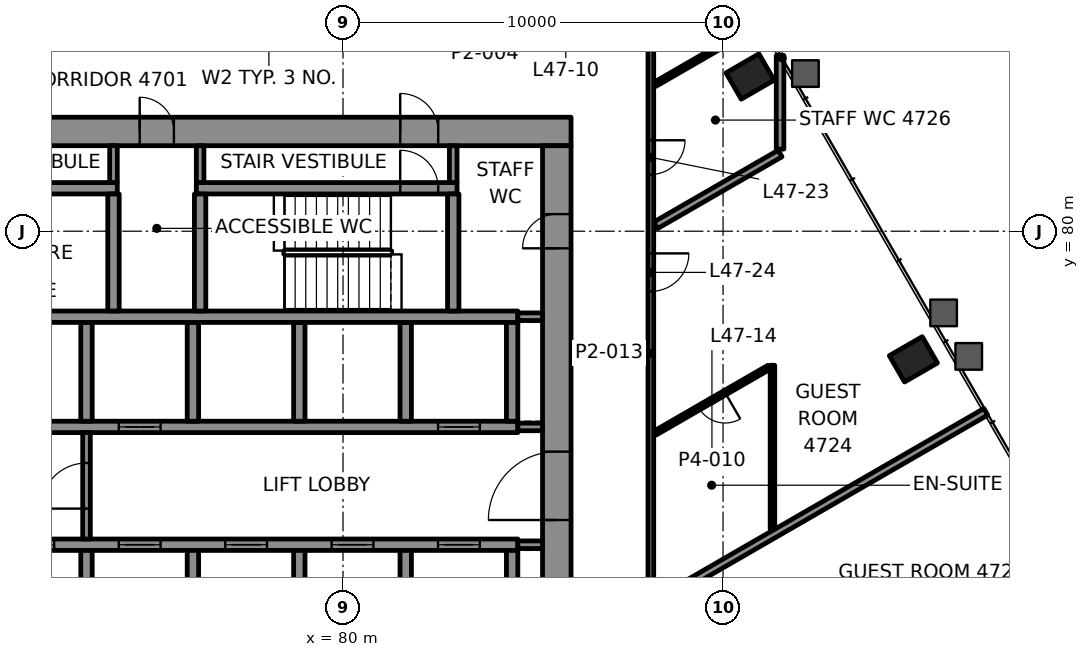
"""IFC4 building model, lengths in metres.
Left out: names, types, materials, properties, quantities, classifications, styles, units other than length and angle.
Written with IfcOpenShell. Run it as: python <this file> out.ifc"""

import sys

from ifc_helpers import new_model, si_unit, direction, frame, frame_2d, origin, origin_2d, place, context, subcontext, project, spatial, rectangle, hollow_rectangle, extrude, element, fill, save


model = new_model("IFC4")
c1 = context("Model", 3, precision=1e-05, world=origin(), true_north=direction((0.0, 1.0)))
c2 = subcontext(c1, "Body", "Model", "MODEL_VIEW")
j1 = project(units=[si_unit("LENGTHUNIT", "METRE"), si_unit("PLANEANGLEUNIT", "RADIAN")], contexts=[c1])
p1 = place(None, origin())
s1 = spatial("IfcSite", under=j1, at=p1, CompositionType="ELEMENT")
p2 = place(p1, origin())
s2 = spatial("IfcBuilding", under=s1, at=p2, CompositionType="ELEMENT")
p3 = place(p2, frame((0.0, 0.0, 202.6)))
s3 = spatial("IfcBuildingStorey", under=s2, at=p3, CompositionType="ELEMENT", Elevation=202.6)
for number, where, z_axis, x_axis in (
    (1, (95.008, 76.628, -0.0), (0.0, 0.0, 1.0), (-0.5, 0.866, 0.0)),
    (2, (90.711, 84.071, -0.0), (0.0, 0.0, 1.0), (-0.5, 0.866, 0.0)),
):
    element("IfcColumn", number, at=place(p3, frame(where, z_axis=z_axis, x_axis=x_axis)), inside=s3, PredefinedType="COLUMN", context=c2, shape_type="SweptSolid", body=[
        extrude(hollow_rectangle(XDim=0.8, YDim=1.0, WallThickness=0.05, at=origin_2d()), origin(), (0.0, 0.0, 1.0), 3.9),
    ])
p4 = place(p3, frame((64.0, 82.625, 0.0), z_axis=(0.0, 0.0, 1.0), x_axis=(1.0, 0.0, 0.0)))
e3 = element("IfcWall", 3, at=p4, inside=s3, PredefinedType="SHEAR", context=c2, shape_type="SweptSolid", body=[
    extrude(rectangle(XDim=22.0, YDim=0.75, at=frame_2d((11.0, 0.0))), origin(), (0.0, 0.0, 1.0), 3.7),
])
p5 = place(p4, frame((3.695, 0.0, 0.0)))
e4 = element("IfcOpeningElement", 4, at=p5, cuts=e3, PredefinedType="OPENING", context=c2, shape_type="SweptSolid", body=[
    extrude(rectangle(XDim=1.0, YDim=2.1, at=frame_2d((0.5, 1.05))), frame((0.0, 0.385, 0.0), z_axis=(0.0, -1.0, 0.0), x_axis=(1.0, 0.0, 0.0)), (0.0, 0.0, 1.0), 0.77),
])
p6 = place(p4, frame((17.505, 0.0, 0.0)))
e5 = element("IfcOpeningElement", 5, at=p6, cuts=e3, PredefinedType="OPENING", context=c2, shape_type="SweptSolid", body=[
    extrude(rectangle(XDim=1.0, YDim=2.1, at=frame_2d((0.5, 1.05))), frame((0.0, 0.385, 0.0), z_axis=(0.0, -1.0, 0.0), x_axis=(1.0, 0.0, 0.0)), (0.0, 0.0, 1.0), 0.77),
])
p7 = place(p4, frame((10.65, 0.0, 0.0)))
e6 = element("IfcOpeningElement", 6, at=p7, cuts=e3, PredefinedType="OPENING", context=c2, shape_type="SweptSolid", body=[
    extrude(rectangle(XDim=0.9, YDim=2.1, at=frame_2d((0.45, 1.05))), frame((0.0, 0.385, 0.0), z_axis=(0.0, -1.0, 0.0), x_axis=(1.0, 0.0, 0.0)), (0.0, 0.0, 1.0), 0.77),
])
p8 = place(p3, frame((85.625, 67.75, 0.0), z_axis=(0.0, 0.0, 1.0), x_axis=(0.0, 1.0, 0.0)))
e7 = element("IfcWall", 7, at=p8, inside=s3, PredefinedType="SHEAR", context=c2, shape_type="SweptSolid", body=[
    extrude(rectangle(XDim=14.5, YDim=0.75, at=frame_2d((7.25, 0.0))), origin(), (0.0, 0.0, 1.0), 3.7),
])
p9 = place(p8, frame((4.65, 0.0, 0.0)))
e8 = element("IfcOpeningElement", 8, at=p9, cuts=e7, PredefinedType="OPENING", context=c2, shape_type="SweptSolid", body=[
    extrude(rectangle(XDim=1.8, YDim=2.1, at=frame_2d((0.9, 1.05))), frame((0.0, 0.385, 0.0), z_axis=(0.0, -1.0, 0.0), x_axis=(1.0, 0.0, 0.0)), (0.0, 0.0, 1.0), 0.77),
])
p10 = place(p8, frame((11.8, 0.0, 0.0)))
e9 = element("IfcOpeningElement", 9, at=p10, cuts=e7, PredefinedType="OPENING", context=c2, shape_type="SweptSolid", body=[
    extrude(rectangle(XDim=0.9, YDim=2.1, at=frame_2d((0.45, 1.05))), frame((0.0, 0.385, 0.0), z_axis=(0.0, -1.0, 0.0), x_axis=(1.0, 0.0, 0.0)), (0.0, 0.0, 1.0), 0.77),
])
p11 = place(p3, frame((70.3, 71.75, 0.0), z_axis=(0.0, 0.0, 1.0), x_axis=(1.0, 0.0, 0.0)))
e10 = element("IfcWall", 10, at=p11, inside=s3, PredefinedType="SHEAR", context=c2, shape_type="SweptSolid", body=[
    extrude(rectangle(XDim=14.3, YDim=0.3, at=frame_2d((7.15, 0.0))), origin(), (0.0, 0.0, 1.0), 3.7),
])
p12 = place(p11, frame((1.0, 0.0, 0.0)))
e11 = element("IfcOpeningElement", 11, at=p12, cuts=e10, PredefinedType="OPENING", context=c2, shape_type="SweptSolid", body=[
    extrude(rectangle(XDim=1.1, YDim=2.1, at=frame_2d((0.55, 1.05))), frame((0.0, 0.16, 0.0), z_axis=(0.0, -1.0, 0.0), x_axis=(1.0, 0.0, 0.0)), (0.0, 0.0, 1.0), 0.32),
])
p13 = place(p11, frame((3.8, 0.0, 0.0)))
e12 = element("IfcOpeningElement", 12, at=p13, cuts=e10, PredefinedType="OPENING", context=c2, shape_type="SweptSolid", body=[
    extrude(rectangle(XDim=1.1, YDim=2.1, at=frame_2d((0.55, 1.05))), frame((0.0, 0.16, 0.0), z_axis=(0.0, -1.0, 0.0), x_axis=(1.0, 0.0, 0.0)), (0.0, 0.0, 1.0), 0.32),
])
p14 = place(p11, frame((6.6, 0.0, 0.0)))
e13 = element("IfcOpeningElement", 13, at=p14, cuts=e10, PredefinedType="OPENING", context=c2, shape_type="SweptSolid", body=[
    extrude(rectangle(XDim=1.1, YDim=2.1, at=frame_2d((0.55, 1.05))), frame((0.0, 0.16, 0.0), z_axis=(0.0, -1.0, 0.0), x_axis=(1.0, 0.0, 0.0)), (0.0, 0.0, 1.0), 0.32),
])
p15 = place(p11, frame((9.4, 0.0, 0.0)))
e14 = element("IfcOpeningElement", 14, at=p15, cuts=e10, PredefinedType="OPENING", context=c2, shape_type="SweptSolid", body=[
    extrude(rectangle(XDim=1.1, YDim=2.1, at=frame_2d((0.55, 1.05))), frame((0.0, 0.16, 0.0), z_axis=(0.0, -1.0, 0.0), x_axis=(1.0, 0.0, 0.0)), (0.0, 0.0, 1.0), 0.32),
])
p16 = place(p11, frame((12.2, 0.0, 0.0)))
e15 = element("IfcOpeningElement", 15, at=p16, cuts=e10, PredefinedType="OPENING", context=c2, shape_type="SweptSolid", body=[
    extrude(rectangle(XDim=1.1, YDim=2.1, at=frame_2d((0.55, 1.05))), frame((0.0, 0.16, 0.0), z_axis=(0.0, -1.0, 0.0), x_axis=(1.0, 0.0, 0.0)), (0.0, 0.0, 1.0), 0.32),
])
p17 = place(p3, frame((70.3, 74.85, 0.0), z_axis=(0.0, 0.0, 1.0), x_axis=(1.0, 0.0, 0.0)))
e16 = element("IfcWall", 16, at=p17, inside=s3, PredefinedType="SHEAR", context=c2, shape_type="SweptSolid", body=[
    extrude(rectangle(XDim=14.3, YDim=0.3, at=frame_2d((7.15, 0.0))), origin(), (0.0, 0.0, 1.0), 3.7),
])
p18 = place(p17, frame((3.8, 0.0, 0.0)))
e17 = element("IfcOpeningElement", 17, at=p18, cuts=e16, PredefinedType="OPENING", context=c2, shape_type="SweptSolid", body=[
    extrude(rectangle(XDim=1.1, YDim=2.1, at=frame_2d((0.55, 1.05))), frame((0.0, 0.16, 0.0), z_axis=(0.0, -1.0, 0.0), x_axis=(1.0, 0.0, 0.0)), (0.0, 0.0, 1.0), 0.32),
])
p19 = place(p17, frame((12.2, 0.0, 0.0)))
e18 = element("IfcOpeningElement", 18, at=p19, cuts=e16, PredefinedType="OPENING", context=c2, shape_type="SweptSolid", body=[
    extrude(rectangle(XDim=1.1, YDim=2.1, at=frame_2d((0.55, 1.05))), frame((0.0, 0.16, 0.0), z_axis=(0.0, -1.0, 0.0), x_axis=(1.0, 0.0, 0.0)), (0.0, 0.0, 1.0), 0.32),
])
for number, where, z_axis, x_axis in (
    (19, (73.25, 69.0, 0.0), (0.0, 0.0, 1.0), (0.0, 1.0, 0.0)),
    (20, (73.25, 75.0, 0.0), (0.0, 0.0, 1.0), (0.0, 1.0, 0.0)),
    (21, (76.05, 69.0, 0.0), (0.0, 0.0, 1.0), (0.0, 1.0, 0.0)),
    (22, (76.05, 75.0, 0.0), (0.0, 0.0, 1.0), (0.0, 1.0, 0.0)),
    (23, (78.85, 69.0, 0.0), (0.0, 0.0, 1.0), (0.0, 1.0, 0.0)),
    (24, (78.85, 75.0, 0.0), (0.0, 0.0, 1.0), (0.0, 1.0, 0.0)),
    (25, (81.65, 69.0, 0.0), (0.0, 0.0, 1.0), (0.0, 1.0, 0.0)),
    (26, (81.65, 75.0, 0.0), (0.0, 0.0, 1.0), (0.0, 1.0, 0.0)),
    (27, (84.45, 69.0, 0.0), (0.0, 0.0, 1.0), (0.0, 1.0, 0.0)),
    (28, (84.45, 75.0, 0.0), (0.0, 0.0, 1.0), (0.0, 1.0, 0.0)),
):
    element("IfcWall", number, at=place(p3, frame(where, z_axis=z_axis, x_axis=x_axis)), inside=s3, PredefinedType="SHEAR", context=c2, shape_type="SweptSolid", body=[
        extrude(rectangle(XDim=2.6, YDim=0.3, at=frame_2d((1.3, 0.0))), origin(), (0.0, 0.0, 1.0), 3.7),
    ])
p20 = place(p3, frame((67.15, 77.75, 0.0), z_axis=(0.0, 0.0, 1.0), x_axis=(1.0, 0.0, 0.0)))
e29 = element("IfcWall", 29, at=p20, inside=s3, PredefinedType="SHEAR", context=c2, shape_type="SweptSolid", body=[
    extrude(rectangle(XDim=17.45, YDim=0.3, at=frame_2d((8.725, 0.0))), origin(), (0.0, 0.0, 1.0), 3.7),
])
p21 = place(p20, frame((0.545, 0.0, 0.0)))
e30 = element("IfcOpeningElement", 30, at=p21, cuts=e29, PredefinedType="OPENING", context=c2, shape_type="SweptSolid", body=[
    extrude(rectangle(XDim=1.0, YDim=2.1, at=frame_2d((0.5, 1.05))), frame((0.0, 0.16, 0.0), z_axis=(0.0, -1.0, 0.0), x_axis=(1.0, 0.0, 0.0)), (0.0, 0.0, 1.0), 0.32),
])
p22 = place(p3, frame((67.15, 81.13, 0.0), z_axis=(0.0, 0.0, 1.0), x_axis=(1.0, 0.0, 0.0)))
e31 = element("IfcWall", 31, at=p22, inside=s3, PredefinedType="SHEAR", context=c2, shape_type="SweptSolid", body=[
    extrude(rectangle(XDim=6.91, YDim=0.3, at=frame_2d((3.455, 0.0))), origin(), (0.0, 0.0, 1.0), 3.7),
])
p23 = place(p22, frame((0.545, 0.0, 0.0)))
e32 = element("IfcOpeningElement", 32, at=p23, cuts=e31, PredefinedType="OPENING", context=c2, shape_type="SweptSolid", body=[
    extrude(rectangle(XDim=1.0, YDim=2.1, at=frame_2d((0.5, 1.05))), frame((0.0, 0.16, 0.0), z_axis=(0.0, -1.0, 0.0), x_axis=(1.0, 0.0, 0.0)), (0.0, 0.0, 1.0), 0.32),
])
p24 = place(p3, frame((76.14, 81.13, 0.0), z_axis=(0.0, 0.0, 1.0), x_axis=(1.0, 0.0, 0.0)))
e33 = element("IfcWall", 33, at=p24, inside=s3, PredefinedType="SHEAR", context=c2, shape_type="SweptSolid", body=[
    extrude(rectangle(XDim=6.86, YDim=0.3, at=frame_2d((3.43, 0.0))), origin(), (0.0, 0.0, 1.0), 3.7),
])
p25 = place(p24, frame((5.365, 0.0, 0.0)))
e34 = element("IfcOpeningElement", 34, at=p25, cuts=e33, PredefinedType="OPENING", context=c2, shape_type="SweptSolid", body=[
    extrude(rectangle(XDim=1.0, YDim=2.1, at=frame_2d((0.5, 1.05))), frame((0.0, 0.16, 0.0), z_axis=(0.0, -1.0, 0.0), x_axis=(1.0, 0.0, 0.0)), (0.0, 0.0, 1.0), 0.32),
])
for number, where, z_axis, x_axis in (
    (35, (73.96, 77.9, 0.0), (0.0, 0.0, 1.0), (0.0, 1.0, 0.0)),
    (36, (76.24, 77.9, 0.0), (0.0, 0.0, 1.0), (0.0, 1.0, 0.0)),
    (37, (82.9, 77.9, 0.0), (0.0, 0.0, 1.0), (0.0, 1.0, 0.0)),
):
    element("IfcWall", number, at=place(p3, frame(where, z_axis=z_axis, x_axis=x_axis)), inside=s3, PredefinedType="SHEAR", context=c2, shape_type="SweptSolid", body=[
        extrude(rectangle(XDim=3.08, YDim=0.3, at=frame_2d((1.54, 0.0))), origin(), (0.0, 0.0, 1.0), 3.7),
    ])
p26 = place(p3, frame((88.227, 70.233, 0.0), z_axis=(0.0, 0.0, 1.0), x_axis=(0.866032780528, 0.499987222889, 0.0)))
e38 = element("IfcWall", 38, at=p26, inside=s3, PredefinedType="PARTITIONING", context=c2, shape_type="SweptSolid", body=[
    extrude(rectangle(XDim=10.031, YDim=0.2, at=frame_2d((5.015, 0.0))), origin(), (0.0, 0.0, 1.0), 3.022),
])
p27 = place(p3, frame((91.205, 76.418, 0.0), z_axis=(0.0, 0.0, 1.0), x_axis=(-0.865997524453, -0.50004828531, 0.0)))
e39 = element("IfcWall", 39, at=p27, inside=s3, PredefinedType="PARTITIONING", context=c2, shape_type="SweptSolid", body=[
    extrude(rectangle(XDim=3.459, YDim=0.12, at=frame_2d((1.729, 0.0))), origin(), (0.0, 0.0, 1.0), 3.1),
])
p28 = place(p27, frame((1.33, 0.0, 0.0)))
e40 = element("IfcOpeningElement", 40, at=p28, cuts=e39, PredefinedType="OPENING", context=c2, shape_type="SweptSolid", body=[
    extrude(rectangle(XDim=0.8, YDim=2.1, at=frame_2d((0.4, 1.05))), frame((0.0, 0.07, 0.0), z_axis=(0.0, -1.0, 0.0), x_axis=(1.0, 0.0, 0.0)), (0.0, 0.0, 1.0), 0.14),
])
p29 = place(p3, frame((88.227, 80.155, 0.0), z_axis=(0.0, 0.0, 1.0), x_axis=(0.86599624775, 0.500050496333, 0.0)))
e41 = element("IfcWall", 41, at=p29, inside=s3, PredefinedType="PARTITIONING", context=c2, shape_type="SweptSolid", body=[
    extrude(rectangle(XDim=3.779, YDim=0.2, at=frame_2d((1.89, 0.0))), origin(), (0.0, 0.0, 1.0), 3.1),
])
p30 = place(p3, frame((88.21, 83.867, 0.0), z_axis=(0.0, 0.0, 1.0), x_axis=(0.86605210011, 0.499953757757, 0.0)))
e42 = element("IfcWall", 42, at=p30, inside=s3, PredefinedType="PARTITIONING", context=c2, shape_type="SweptSolid", body=[
    extrude(rectangle(XDim=3.228, YDim=0.12, at=frame_2d((1.614, 0.0))), origin(), (0.0, 0.0, 1.0), 3.022),
])
p31 = place(p3, frame((91.5, 82.161, 0.0), z_axis=(0.0, 0.0, 1.0), x_axis=(0.0, 1.0, 0.0)))
e43 = element("IfcWall", 43, at=p31, inside=s3, PredefinedType="PARTITIONING", context=c2, shape_type="SweptSolid", body=[
    extrude(rectangle(XDim=2.464, YDim=0.2, at=frame_2d((1.232, 0.0))), origin(), (0.0, 0.0, 1.0), 3.022),
])
p32 = place(p3, frame((91.3, 72.162, 0.0), z_axis=(0.0, 0.0, 1.0), x_axis=(0.0, 1.0, 0.0)))
e44 = element("IfcWall", 44, at=p32, inside=s3, PredefinedType="PARTITIONING", context=c2, shape_type="SweptSolid", body=[
    extrude(rectangle(XDim=4.31, YDim=0.12, at=frame_2d((2.155, 0.0))), origin(), (0.0, 0.0, 1.0), 3.1),
])
p33 = place(p3, frame((88.1, 85.1, 0.0), z_axis=(0.0, 0.0, 1.0), x_axis=(0.0, -1.0, 0.0)))
e45 = element("IfcWall", 45, at=p33, inside=s3, PredefinedType="PARTITIONING", context=c2, shape_type="SweptSolid", body=[
    extrude(rectangle(XDim=16.624, YDim=0.15, at=frame_2d((8.312, 0.0))), origin(), (0.0, 0.0, 1.0), 3.1),
])
p34 = place(p33, frame((2.707, 0.0, 0.0)))
e46 = element("IfcOpeningElement", 46, at=p34, cuts=e45, PredefinedType="OPENING", context=c2, shape_type="SweptSolid", body=[
    extrude(rectangle(XDim=0.9, YDim=2.1, at=frame_2d((0.45, 1.05))), frame((0.0, 0.085, 0.0), z_axis=(0.0, -1.0, 0.0), x_axis=(1.0, 0.0, 0.0)), (0.0, 0.0, 1.0), 0.17),
])
p35 = place(p33, frame((5.684, 0.0, 0.0)))
e47 = element("IfcOpeningElement", 47, at=p35, cuts=e45, PredefinedType="OPENING", context=c2, shape_type="SweptSolid", body=[
    extrude(rectangle(XDim=1.0, YDim=2.1, at=frame_2d((0.5, 1.05))), frame((0.0, 0.085, 0.0), z_axis=(0.0, -1.0, 0.0), x_axis=(1.0, 0.0, 0.0)), (0.0, 0.0, 1.0), 0.17),
])
p36 = place(p33, frame((15.01, 0.0, 0.0)))
e48 = element("IfcOpeningElement", 48, at=p36, cuts=e45, PredefinedType="OPENING", context=c2, shape_type="SweptSolid", body=[
    extrude(rectangle(XDim=1.0, YDim=2.1, at=frame_2d((0.5, 1.05))), frame((0.0, 0.085, 0.0), z_axis=(0.0, -1.0, 0.0), x_axis=(1.0, 0.0, 0.0)), (0.0, 0.0, 1.0), 0.17),
])
for number, where, z_axis, x_axis in (
    (49, (84.6, 71.75, 0.0), (0.0, 0.0, 1.0), (1.0, 0.0, 0.0)),
    (50, (84.6, 74.85, 0.0), (0.0, 0.0, 1.0), (1.0, 0.0, 0.0)),
    (51, (84.6, 77.75, 0.0), (0.0, 0.0, 1.0), (1.0, 0.0, 0.0)),
):
    element("IfcWall", number, at=place(p3, frame(where, z_axis=z_axis, x_axis=x_axis)), inside=s3, PredefinedType="PARTITIONING", context=c2, shape_type="SweptSolid", body=[
        extrude(rectangle(XDim=0.65, YDim=0.2, at=frame_2d((0.325, 0.0))), origin(), (0.0, 0.0, 1.0), 3.7),
    ])
p37 = place(p3, frame((73.25, 71.9, 0.0), z_axis=(0.0, 0.0, 1.0), x_axis=(0.0, 1.0, 0.0)))
e52 = element("IfcWall", 52, at=p37, inside=s3, PredefinedType="PARTITIONING", context=c2, shape_type="SweptSolid", body=[
    extrude(rectangle(XDim=2.8, YDim=0.2, at=frame_2d((1.4, 0.0))), origin(), (0.0, 0.0, 1.0), 3.7),
])
p38 = place(p37, frame((0.8, 0.0, 0.0)))
e53 = element("IfcOpeningElement", 53, at=p38, cuts=e52, PredefinedType="OPENING", context=c2, shape_type="SweptSolid", body=[
    extrude(rectangle(XDim=1.2, YDim=2.1, at=frame_2d((0.6, 1.05))), frame((0.0, 0.11, 0.0), z_axis=(0.0, -1.0, 0.0), x_axis=(1.0, 0.0, 0.0)), (0.0, 0.0, 1.0), 0.22),
])
for number, where, z_axis, x_axis in (
    (54, (73.96, 81.28, 0.0), (0.0, 0.0, 1.0), (0.0, 1.0, 0.0)),
    (55, (76.24, 81.28, 0.0), (0.0, 0.0, 1.0), (0.0, 1.0, 0.0)),
    (56, (82.9, 81.28, 0.0), (0.0, 0.0, 1.0), (0.0, 1.0, 0.0)),
):
    element("IfcWall", number, at=place(p3, frame(where, z_axis=z_axis, x_axis=x_axis)), inside=s3, PredefinedType="PARTITIONING", context=c2, shape_type="SweptSolid", body=[
        extrude(rectangle(XDim=0.97, YDim=0.2, at=frame_2d((0.485, 0.0))), origin(), (0.0, 0.0, 1.0), 3.7),
    ])
p39 = place(p28, origin())
e57 = element("IfcDoor", 57, at=p39, inside=s3, OperationType="SINGLE_SWING_LEFT", PredefinedType="DOOR", context=c2, shape_type="SweptSolid", body=[
    extrude(rectangle(XDim=0.8, YDim=2.1, at=frame_2d((0.4, 1.05))), frame((0.0, 0.025, 0.0), z_axis=(0.0, -1.0, 0.0), x_axis=(1.0, 0.0, 0.0)), (0.0, 0.0, 1.0), 0.05),
])
fill(e40, e57)
p40 = place(p34, origin())
e58 = element("IfcDoor", 58, at=p40, inside=s3, OperationType="SINGLE_SWING_RIGHT", PredefinedType="DOOR", context=c2, shape_type="SweptSolid", body=[
    extrude(rectangle(XDim=0.9, YDim=2.1, at=frame_2d((0.45, 1.05))), frame((0.0, 0.025, 0.0), z_axis=(0.0, -1.0, 0.0), x_axis=(1.0, 0.0, 0.0)), (0.0, 0.0, 1.0), 0.05),
])
fill(e46, e58)
p41 = place(p35, origin())
e59 = element("IfcDoor", 59, at=p41, inside=s3, OperationType="SINGLE_SWING_RIGHT", PredefinedType="DOOR", context=c2, shape_type="SweptSolid", body=[
    extrude(rectangle(XDim=1.0, YDim=2.1, at=frame_2d((0.5, 1.05))), frame((0.0, 0.025, 0.0), z_axis=(0.0, -1.0, 0.0), x_axis=(1.0, 0.0, 0.0)), (0.0, 0.0, 1.0), 0.05),
])
fill(e47, e59)
p42 = place(p12, origin())
e60 = element("IfcDoor", 60, at=p42, inside=s3, OperationType="DOUBLE_DOOR_SLIDING", PredefinedType="DOOR", context=c2, shape_type="SweptSolid", body=[
    extrude(rectangle(XDim=1.1, YDim=2.1, at=frame_2d((0.55, 1.05))), frame((0.0, 0.025, 0.0), z_axis=(0.0, -1.0, 0.0), x_axis=(1.0, 0.0, 0.0)), (0.0, 0.0, 1.0), 0.05),
])
fill(e11, e60)
p43 = place(p13, origin())
e61 = element("IfcDoor", 61, at=p43, inside=s3, OperationType="DOUBLE_DOOR_SLIDING", PredefinedType="DOOR", context=c2, shape_type="SweptSolid", body=[
    extrude(rectangle(XDim=1.1, YDim=2.1, at=frame_2d((0.55, 1.05))), frame((0.0, 0.025, 0.0), z_axis=(0.0, -1.0, 0.0), x_axis=(1.0, 0.0, 0.0)), (0.0, 0.0, 1.0), 0.05),
])
fill(e12, e61)
p44 = place(p14, origin())
e62 = element("IfcDoor", 62, at=p44, inside=s3, OperationType="DOUBLE_DOOR_SLIDING", PredefinedType="DOOR", context=c2, shape_type="SweptSolid", body=[
    extrude(rectangle(XDim=1.1, YDim=2.1, at=frame_2d((0.55, 1.05))), frame((0.0, 0.025, 0.0), z_axis=(0.0, -1.0, 0.0), x_axis=(1.0, 0.0, 0.0)), (0.0, 0.0, 1.0), 0.05),
])
fill(e13, e62)
p45 = place(p15, origin())
e63 = element("IfcDoor", 63, at=p45, inside=s3, OperationType="DOUBLE_DOOR_SLIDING", PredefinedType="DOOR", context=c2, shape_type="SweptSolid", body=[
    extrude(rectangle(XDim=1.1, YDim=2.1, at=frame_2d((0.55, 1.05))), frame((0.0, 0.025, 0.0), z_axis=(0.0, -1.0, 0.0), x_axis=(1.0, 0.0, 0.0)), (0.0, 0.0, 1.0), 0.05),
])
fill(e14, e63)
p46 = place(p16, origin())
e64 = element("IfcDoor", 64, at=p46, inside=s3, OperationType="DOUBLE_DOOR_SLIDING", PredefinedType="DOOR", context=c2, shape_type="SweptSolid", body=[
    extrude(rectangle(XDim=1.1, YDim=2.1, at=frame_2d((0.55, 1.05))), frame((0.0, 0.025, 0.0), z_axis=(0.0, -1.0, 0.0), x_axis=(1.0, 0.0, 0.0)), (0.0, 0.0, 1.0), 0.05),
])
fill(e15, e64)
p47 = place(p18, origin())
e65 = element("IfcDoor", 65, at=p47, inside=s3, OperationType="DOUBLE_DOOR_SLIDING", PredefinedType="DOOR", context=c2, shape_type="SweptSolid", body=[
    extrude(rectangle(XDim=1.1, YDim=2.1, at=frame_2d((0.55, 1.05))), frame((0.0, 0.025, 0.0), z_axis=(0.0, -1.0, 0.0), x_axis=(1.0, 0.0, 0.0)), (0.0, 0.0, 1.0), 0.05),
])
fill(e17, e65)
p48 = place(p19, origin())
e66 = element("IfcDoor", 66, at=p48, inside=s3, OperationType="DOUBLE_DOOR_SLIDING", PredefinedType="DOOR", context=c2, shape_type="SweptSolid", body=[
    extrude(rectangle(XDim=1.1, YDim=2.1, at=frame_2d((0.55, 1.05))), frame((0.0, 0.025, 0.0), z_axis=(0.0, -1.0, 0.0), x_axis=(1.0, 0.0, 0.0)), (0.0, 0.0, 1.0), 0.05),
])
fill(e18, e66)
p49 = place(p25, origin())
e67 = element("IfcDoor", 67, at=p49, inside=s3, OperationType="SINGLE_SWING_RIGHT", PredefinedType="DOOR", context=c2, shape_type="SweptSolid", body=[
    extrude(rectangle(XDim=1.0, YDim=2.1, at=frame_2d((0.5, 1.05))), frame((0.0, 0.025, 0.0), z_axis=(0.0, -1.0, 0.0), x_axis=(1.0, 0.0, 0.0)), (0.0, 0.0, 1.0), 0.05),
])
fill(e34, e67)
p50 = place(p6, origin())
e68 = element("IfcDoor", 68, at=p50, inside=s3, OperationType="SINGLE_SWING_LEFT", PredefinedType="DOOR", context=c2, shape_type="SweptSolid", body=[
    extrude(rectangle(XDim=1.0, YDim=2.1, at=frame_2d((0.5, 1.05))), frame((0.0, 0.095, 0.0), z_axis=(0.0, -1.0, 0.0), x_axis=(1.0, 0.0, 0.0)), (0.0, 0.0, 1.0), 0.19),
])
fill(e5, e68)
p51 = place(p38, origin())
e69 = element("IfcDoor", 69, at=p51, inside=s3, OperationType="SINGLE_SWING_LEFT", PredefinedType="DOOR", context=c2, shape_type="SweptSolid", body=[
    extrude(rectangle(XDim=1.2, YDim=2.1, at=frame_2d((0.6, 1.05))), frame((0.0, 0.025, 0.0), z_axis=(0.0, -1.0, 0.0), x_axis=(1.0, 0.0, 0.0)), (0.0, 0.0, 1.0), 0.05),
])
fill(e53, e69)
p52 = place(p9, origin())
e70 = element("IfcDoor", 70, at=p52, inside=s3, OperationType="SINGLE_SWING_RIGHT", PredefinedType="DOOR", context=c2, shape_type="SweptSolid", body=[
    extrude(rectangle(XDim=1.8, YDim=2.1, at=frame_2d((0.9, 1.05))), frame((0.0, 0.095, 0.0), z_axis=(0.0, -1.0, 0.0), x_axis=(1.0, 0.0, 0.0)), (0.0, 0.0, 1.0), 0.19),
])
fill(e8, e70)
p53 = place(p7, origin())
e71 = element("IfcDoor", 71, at=p53, inside=s3, OperationType="SINGLE_SWING_RIGHT", PredefinedType="DOOR", context=c2, shape_type="SweptSolid", body=[
    extrude(rectangle(XDim=0.9, YDim=2.1, at=frame_2d((0.45, 1.05))), frame((0.0, 0.095, 0.0), z_axis=(0.0, -1.0, 0.0), x_axis=(1.0, 0.0, 0.0)), (0.0, 0.0, 1.0), 0.19),
])
fill(e6, e71)
p54 = place(p10, origin())
e72 = element("IfcDoor", 72, at=p54, inside=s3, OperationType="SINGLE_SWING_LEFT", PredefinedType="DOOR", context=c2, shape_type="SweptSolid", body=[
    extrude(rectangle(XDim=0.9, YDim=2.1, at=frame_2d((0.45, 1.05))), frame((0.0, 0.095, 0.0), z_axis=(0.0, -1.0, 0.0), x_axis=(1.0, 0.0, 0.0)), (0.0, 0.0, 1.0), 0.19),
])
fill(e9, e72)
save(model, sys.argv[1])
